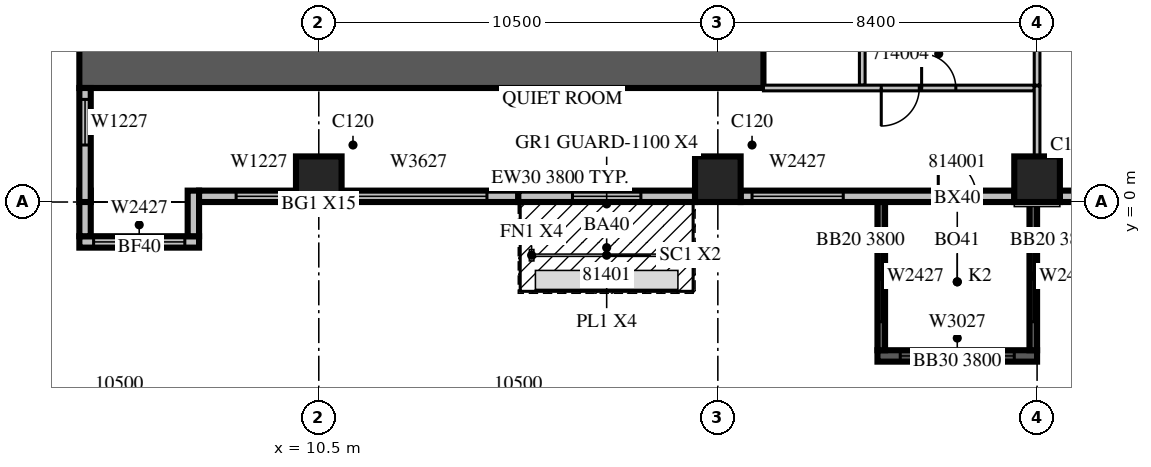
"""IFC4 building model, lengths in metres.
Left out: names, types, materials, properties, quantities, classifications, styles, units other than length and angle.
Written with IfcOpenShell. Run it as: python <this file> out.ifc"""

import sys

from ifc_helpers import new_model, si_unit, direction, frame, frame_2d, origin, origin_2d, place, context, subcontext, project, spatial, rectangle, extrude, source, transform, mapped, element, fill, save


model = new_model("IFC4")
c1 = context("Model", 3, precision=1e-05, world=origin(), true_north=direction((0.0, 1.0)))
c2 = subcontext(c1, "Body", "Model", "MODEL_VIEW")
j1 = project(units=[si_unit("LENGTHUNIT", "METRE"), si_unit("PLANEANGLEUNIT", "RADIAN")], contexts=[c1])
p1 = place(None, origin())
s1 = spatial("IfcSite", under=j1, at=p1, CompositionType="ELEMENT")
p2 = place(p1, origin())
s2 = spatial("IfcBuilding", under=s1, at=p2, CompositionType="ELEMENT")
p3 = place(p2, frame((0.0, 0.0, 69.9)))
s3 = spatial("IfcBuildingStorey", under=s2, at=p3, CompositionType="ELEMENT", Elevation=69.9)
m1 = source(origin(), c2, "Body", "SweptSolid", [
    extrude(rectangle(XDim=1.2, YDim=1.2, at=origin_2d()), origin(), (0.0, 0.0, 1.0), 4.2),
])
for number, where, z_axis, x_axis in (
    (1, (10.5, 0.6, 0.0), (0.0, 0.0, 1.0), (1.0, 0.0, 0.0)),
    (2, (21.0, 0.6, 0.0), (0.0, 0.0, 1.0), (1.0, 0.0, 0.0)),
    (3, (29.4, 0.6, 0.0), (0.0, 0.0, 1.0), (1.0, 0.0, 0.0)),
):
    element("IfcColumn", number, at=place(p3, frame(where, z_axis=z_axis, x_axis=x_axis)), inside=s3, PredefinedType="COLUMN", context=c2, shape_type="MappedRepresentation", body=[
        mapped(m1, transform((0.0, 0.0, 0.0), scale=1.0)),
    ])
m2 = source(origin(), c2, "Body", "SweptSolid", [
    extrude(rectangle(XDim=18.0, YDim=1.2, at=frame_2d((9.0, 0.0))), origin(), (0.0, 0.0, 1.0), 4.2),
])
p4 = place(p3, frame((4.2, 3.6, 0.0), z_axis=(0.0, 0.0, 1.0), x_axis=(1.0, 0.0, 0.0)))
e4 = element("IfcWall", 4, at=p4, inside=s3, PredefinedType="SHEAR", context=c2, shape_type="MappedRepresentation", body=[
    mapped(m2, transform((0.0, 0.0, 0.0), scale=1.0)),
])
m3 = source(origin(), c2, "Body", "SweptSolid", [
    extrude(rectangle(XDim=4.2, YDim=0.3, at=frame_2d((2.1, 0.0))), origin(), (0.0, 0.0, 1.0), 3.8),
])
p5 = place(p3, frame((25.2, -4.05, 0.0), z_axis=(0.0, 0.0, 1.0), x_axis=(1.0, 0.0, 0.0)))
e5 = element("IfcWall", 5, at=p5, inside=s3, PredefinedType="SOLIDWALL", context=c2, shape_type="MappedRepresentation", body=[
    mapped(m3, transform((0.0, 0.0, 0.0), scale=1.0)),
])
m4 = source(origin(), c2, "Body", "SweptSolid", [
    extrude(rectangle(XDim=3.0, YDim=2.7, at=frame_2d((1.5, 1.35))), frame((0.0, 0.16, 0.0), z_axis=(0.0, -1.0, 0.0), x_axis=(1.0, 0.0, 0.0)), (0.0, 0.0, 1.0), 0.32),
])
p6 = place(p5, frame((0.6, 0.0, 0.6)))
e6 = element("IfcOpeningElement", 6, at=p6, cuts=e5, PredefinedType="OPENING", context=c2, shape_type="MappedRepresentation", body=[
    mapped(m4, transform((0.0, 0.0, 0.0), scale=1.0)),
])
m5 = source(origin(), c2, "Body", "SweptSolid", [
    extrude(rectangle(XDim=3.9, YDim=0.2, at=frame_2d((1.95, 0.0))), origin(), (0.0, 0.0, 1.0), 3.8),
])
p7 = place(p3, frame((25.3, 0.0, 0.0), z_axis=(0.0, 0.0, 1.0), x_axis=(0.0, -1.0, 0.0)))
e7 = element("IfcWall", 7, at=p7, inside=s3, PredefinedType="SOLIDWALL", context=c2, shape_type="MappedRepresentation", body=[
    mapped(m5, transform((0.0, 0.0, 0.0), scale=1.0)),
])
m6 = source(origin(), c2, "Body", "SweptSolid", [
    extrude(rectangle(XDim=2.4, YDim=2.7, at=frame_2d((1.2, 1.35))), frame((0.0, 0.11, 0.0), z_axis=(0.0, -1.0, 0.0), x_axis=(1.0, 0.0, 0.0)), (0.0, 0.0, 1.0), 0.22),
])
p8 = place(p7, frame((0.75, 0.0, 0.6)))
e8 = element("IfcOpeningElement", 8, at=p8, cuts=e7, PredefinedType="OPENING", context=c2, shape_type="MappedRepresentation", body=[
    mapped(m6, transform((0.0, 0.0, 0.0), scale=1.0)),
])
p9 = place(p3, frame((29.3, 0.0, 0.0), z_axis=(0.0, 0.0, 1.0), x_axis=(0.0, -1.0, 0.0)))
e9 = element("IfcWall", 9, at=p9, inside=s3, PredefinedType="SOLIDWALL", context=c2, shape_type="MappedRepresentation", body=[
    mapped(m5, transform((0.0, 0.0, 0.0), scale=1.0)),
])
p10 = place(p9, frame((0.75, 0.0, 0.6)))
e10 = element("IfcOpeningElement", 10, at=p10, cuts=e9, PredefinedType="OPENING", context=c2, shape_type="MappedRepresentation", body=[
    mapped(m6, transform((0.0, 0.0, 0.0), scale=1.0)),
])
m7 = source(origin(), c2, "Body", "SweptSolid", [
    extrude(rectangle(XDim=3.15, YDim=0.3, at=frame_2d((1.575, 0.0))), origin(), (0.0, 0.0, 1.0), 3.8),
])
p11 = place(p3, frame((4.2, -1.05, 0.0), z_axis=(0.0, 0.0, 1.0), x_axis=(1.0, 0.0, 0.0)))
e11 = element("IfcWall", 11, at=p11, inside=s3, PredefinedType="STANDARD", context=c2, shape_type="MappedRepresentation", body=[
    mapped(m7, transform((0.0, 0.0, 0.0), scale=1.0)),
])
m8 = source(origin(), c2, "Body", "SweptSolid", [
    extrude(rectangle(XDim=2.4, YDim=2.7, at=frame_2d((1.2, 1.35))), frame((0.0, 0.16, 0.0), z_axis=(0.0, -1.0, 0.0), x_axis=(1.0, 0.0, 0.0)), (0.0, 0.0, 1.0), 0.32),
])
p12 = place(p11, frame((0.375, 0.0, 0.6)))
e12 = element("IfcOpeningElement", 12, at=p12, cuts=e11, PredefinedType="OPENING", context=c2, shape_type="MappedRepresentation", body=[
    mapped(m8, transform((0.0, 0.0, 0.0), scale=1.0)),
])
m9 = source(origin(), c2, "Body", "SweptSolid", [
    extrude(rectangle(XDim=1.2, YDim=0.3, at=frame_2d((0.6, 0.0))), origin(), (0.0, 0.0, 1.0), 3.8),
])
for number, where, z_axis, x_axis in (
    (13, (4.35, 0.3, 0.0), (0.0, 0.0, 1.0), (0.0, -1.0, 0.0)),
    (14, (7.2, 0.3, 0.0), (0.0, 0.0, 1.0), (0.0, -1.0, 0.0)),
):
    element("IfcWall", number, at=place(p3, frame(where, z_axis=z_axis, x_axis=x_axis)), inside=s3, PredefinedType="STANDARD", context=c2, shape_type="MappedRepresentation", body=[
        mapped(m9, transform((0.0, 0.0, 0.0), scale=1.0)),
    ])
m10 = source(origin(), c2, "Body", "SweptSolid", [
    extrude(rectangle(XDim=2.55, YDim=0.3, at=frame_2d((1.275, 0.0))), origin(), (0.0, 0.0, 1.0), 3.8),
])
p13 = place(p3, frame((7.35, 0.15, 0.0), z_axis=(0.0, 0.0, 1.0), x_axis=(1.0, 0.0, 0.0)))
e15 = element("IfcWall", 15, at=p13, inside=s3, PredefinedType="STANDARD", context=c2, shape_type="MappedRepresentation", body=[
    mapped(m10, transform((0.0, 0.0, 0.0), scale=1.0)),
])
m11 = source(origin(), c2, "Body", "SweptSolid", [
    extrude(rectangle(XDim=1.2, YDim=2.7, at=frame_2d((0.6, 1.35))), frame((0.0, 0.16, 0.0), z_axis=(0.0, -1.0, 0.0), x_axis=(1.0, 0.0, 0.0)), (0.0, 0.0, 1.0), 0.32),
])
p14 = place(p13, frame((0.975, 0.0, 0.6)))
e16 = element("IfcOpeningElement", 16, at=p14, cuts=e15, PredefinedType="OPENING", context=c2, shape_type="MappedRepresentation", body=[
    mapped(m11, transform((0.0, 0.0, 0.0), scale=1.0)),
])
m12 = source(origin(), c2, "Body", "SweptSolid", [
    extrude(rectangle(XDim=4.65, YDim=0.3, at=frame_2d((2.325, 0.0))), origin(), (0.0, 0.0, 1.0), 3.8),
])
p15 = place(p3, frame((11.1, 0.15, 0.0), z_axis=(0.0, 0.0, 1.0), x_axis=(1.0, 0.0, 0.0)))
e17 = element("IfcWall", 17, at=p15, inside=s3, PredefinedType="STANDARD", context=c2, shape_type="MappedRepresentation", body=[
    mapped(m12, transform((0.0, 0.0, 0.0), scale=1.0)),
])
m13 = source(origin(), c2, "Body", "SweptSolid", [
    extrude(rectangle(XDim=3.6, YDim=2.7, at=frame_2d((1.8, 1.35))), frame((0.0, 0.16, 0.0), z_axis=(0.0, -1.0, 0.0), x_axis=(1.0, 0.0, 0.0)), (0.0, 0.0, 1.0), 0.32),
])
p16 = place(p15, frame((0.225, 0.0, 0.6)))
e18 = element("IfcOpeningElement", 18, at=p16, cuts=e17, PredefinedType="OPENING", context=c2, shape_type="MappedRepresentation", body=[
    mapped(m13, transform((0.0, 0.0, 0.0), scale=1.0)),
])
p17 = place(p3, frame((15.75, 0.15, 0.0), z_axis=(0.0, 0.0, 1.0), x_axis=(1.0, 0.0, 0.0)))
e19 = element("IfcWall", 19, at=p17, inside=s3, PredefinedType="STANDARD", context=c2, shape_type="MappedRepresentation", body=[
    mapped(m12, transform((0.0, 0.0, 0.0), scale=1.0)),
])
m14 = source(origin(), c2, "Body", "SweptSolid", [
    extrude(rectangle(XDim=1.8, YDim=2.4, at=frame_2d((0.9, 1.2))), frame((0.0, 0.16, 0.0), z_axis=(0.0, -1.0, 0.0), x_axis=(1.0, 0.0, 0.0)), (0.0, 0.0, 1.0), 0.32),
])
p18 = place(p17, frame((1.425, 0.0, 0.0)))
e20 = element("IfcOpeningElement", 20, at=p18, cuts=e19, PredefinedType="OPENING", context=c2, shape_type="MappedRepresentation", body=[
    mapped(m14, transform((0.0, 0.0, 0.0), scale=1.0)),
])
m15 = source(origin(), c2, "Body", "SweptSolid", [
    extrude(rectangle(XDim=7.2, YDim=0.3, at=frame_2d((3.6, 0.0))), origin(), (0.0, 0.0, 1.0), 3.8),
])
p19 = place(p3, frame((21.6, 0.15, 0.0), z_axis=(0.0, 0.0, 1.0), x_axis=(1.0, 0.0, 0.0)))
e21 = element("IfcWall", 21, at=p19, inside=s3, PredefinedType="STANDARD", context=c2, shape_type="MappedRepresentation", body=[
    mapped(m15, transform((0.0, 0.0, 0.0), scale=1.0)),
])
p20 = place(p19, frame((0.3, 0.0, 0.6)))
e22 = element("IfcOpeningElement", 22, at=p20, cuts=e21, PredefinedType="OPENING", context=c2, shape_type="MappedRepresentation", body=[
    mapped(m8, transform((0.0, 0.0, 0.0), scale=1.0)),
])
m16 = source(origin(), c2, "Body", "SweptSolid", [
    extrude(rectangle(XDim=1.0, YDim=2.1, at=frame_2d((0.5, 1.05))), frame((0.0, 0.16, 0.0), z_axis=(0.0, -1.0, 0.0), x_axis=(1.0, 0.0, 0.0)), (0.0, 0.0, 1.0), 0.32),
])
p21 = place(p19, frame((5.2, 0.0, 0.0)))
e23 = element("IfcOpeningElement", 23, at=p21, cuts=e21, PredefinedType="OPENING", context=c2, shape_type="MappedRepresentation", body=[
    mapped(m16, transform((0.0, 0.0, 0.0), scale=1.0)),
])
p22 = place(p3, frame((30.0, 0.15, 0.0), z_axis=(0.0, 0.0, 1.0), x_axis=(1.0, 0.0, 0.0)))
e24 = element("IfcWall", 24, at=p22, inside=s3, PredefinedType="STANDARD", context=c2, shape_type="MappedRepresentation", body=[
    mapped(m15, transform((0.0, 0.0, 0.0), scale=1.0)),
])
m17 = source(origin(), c2, "Body", "SweptSolid", [
    extrude(rectangle(XDim=3.0, YDim=0.3, at=frame_2d((1.5, 0.0))), origin(), (0.0, 0.0, 1.0), 3.8),
])
p23 = place(p3, frame((4.35, 3.0, 0.0), z_axis=(0.0, 0.0, 1.0), x_axis=(0.0, -1.0, 0.0)))
e25 = element("IfcWall", 25, at=p23, inside=s3, PredefinedType="STANDARD", context=c2, shape_type="MappedRepresentation", body=[
    mapped(m17, transform((0.0, 0.0, 0.0), scale=1.0)),
])
p24 = place(p23, frame((0.3, 0.0, 0.6)))
e26 = element("IfcOpeningElement", 26, at=p24, cuts=e25, PredefinedType="OPENING", context=c2, shape_type="MappedRepresentation", body=[
    mapped(m11, transform((0.0, 0.0, 0.0), scale=1.0)),
])
m18 = source(origin(), c2, "Body", "SweptSolid", [
    extrude(rectangle(XDim=11.925, YDim=0.15, at=frame_2d((5.963, 0.0))), origin(), (0.0, 0.0, 1.0), 3.8),
])
p25 = place(p3, frame((24.8, 15.0, 0.0), z_axis=(0.0, 0.0, 1.0), x_axis=(0.0, -1.0, 0.0)))
e27 = element("IfcWall", 27, at=p25, inside=s3, PredefinedType="PARTITIONING", context=c2, shape_type="MappedRepresentation", body=[
    mapped(m18, transform((0.0, 0.0, 0.0), scale=1.0)),
])
m19 = source(origin(), c2, "Body", "SweptSolid", [
    extrude(rectangle(XDim=0.9, YDim=2.1, at=frame_2d((0.45, 1.05))), frame((0.0, 0.085, 0.0), z_axis=(0.0, -1.0, 0.0), x_axis=(1.0, 0.0, 0.0)), (0.0, 0.0, 1.0), 0.17),
])
p26 = place(p25, frame((7.162, 0.0, 0.0)))
e28 = element("IfcOpeningElement", 28, at=p26, cuts=e27, PredefinedType="OPENING", context=c2, shape_type="MappedRepresentation", body=[
    mapped(m19, transform((0.0, 0.0, 0.0), scale=1.0)),
])
p27 = place(p25, frame((0.325, 0.0, 0.0)))
e29 = element("IfcOpeningElement", 29, at=p27, cuts=e27, PredefinedType="OPENING", context=c2, shape_type="MappedRepresentation", body=[
    mapped(m19, transform((0.0, 0.0, 0.0), scale=1.0)),
])
m20 = source(origin(), c2, "Body", "SweptSolid", [
    extrude(rectangle(XDim=6.826, YDim=0.15, at=frame_2d((3.413, 0.0))), origin(), (0.0, 0.0, 1.0), 3.8),
])
p28 = place(p3, frame((29.4, 3.075, 0.0), z_axis=(0.0, 0.0, 1.0), x_axis=(0.0, 1.0, 0.0)))
e30 = element("IfcWall", 30, at=p28, inside=s3, PredefinedType="PARTITIONING", context=c2, shape_type="MappedRepresentation", body=[
    mapped(m20, transform((0.0, 0.0, 0.0), scale=1.0)),
])
m21 = source(origin(), c2, "Body", "SweptSolid", [
    extrude(rectangle(XDim=7.125, YDim=0.15, at=frame_2d((3.562, 0.0))), origin(), (0.0, 0.0, 1.0), 3.8),
])
p29 = place(p3, frame((22.2, 3.0, 0.0), z_axis=(0.0, 0.0, 1.0), x_axis=(1.0, 0.0, 0.0)))
e31 = element("IfcWall", 31, at=p29, inside=s3, PredefinedType="PARTITIONING", context=c2, shape_type="MappedRepresentation", body=[
    mapped(m21, transform((0.0, 0.0, 0.0), scale=1.0)),
])
m22 = source(origin(), c2, "Body", "SweptSolid", [
    extrude(rectangle(XDim=1.0, YDim=2.1, at=frame_2d((0.5, 1.05))), frame((0.0, 0.085, 0.0), z_axis=(0.0, -1.0, 0.0), x_axis=(1.0, 0.0, 0.0)), (0.0, 0.0, 1.0), 0.17),
])
p30 = place(p29, frame((3.1, 0.0, 0.0)))
e32 = element("IfcOpeningElement", 32, at=p30, cuts=e31, PredefinedType="OPENING", context=c2, shape_type="MappedRepresentation", body=[
    mapped(m22, transform((0.0, 0.0, 0.0), scale=1.0)),
])
p31 = place(p29, frame((4.162, 0.0, 0.0)))
e33 = element("IfcOpeningElement", 33, at=p31, cuts=e31, PredefinedType="OPENING", context=c2, shape_type="MappedRepresentation", body=[
    mapped(m19, transform((0.0, 0.0, 0.0), scale=1.0)),
])
m23 = source(origin(), c2, "Body", "SweptSolid", [
    extrude(rectangle(XDim=1.856, YDim=0.15, at=frame_2d((0.928, 0.0))), origin(), (0.0, 0.0, 1.0), 3.8),
])
p32 = place(p3, frame((29.4, 1.199, 0.0), z_axis=(0.0, 0.0, 1.0), x_axis=(0.0, 1.0, 0.0)))
e34 = element("IfcWall", 34, at=p32, inside=s3, PredefinedType="PARTITIONING", context=c2, shape_type="MappedRepresentation", body=[
    mapped(m23, transform((0.0, 0.0, 0.0), scale=1.0)),
])
m24 = source(origin(), c2, "Body", "SweptSolid", [
    extrude(rectangle(XDim=3.0, YDim=2.7, at=frame_2d((1.5, 1.35))), frame((0.0, 0.03, 0.0), z_axis=(0.0, -1.0, 0.0), x_axis=(1.0, 0.0, 0.0)), (0.0, 0.0, 1.0), 0.06),
])
p33 = place(p6, origin())
e35 = element("IfcWindow", 35, at=p33, inside=s3, PartitioningType="SINGLE_PANEL", PredefinedType="WINDOW", context=c2, shape_type="MappedRepresentation", body=[
    mapped(m24, transform((0.0, 0.0, 0.0), scale=1.0)),
])
fill(e6, e35)
m25 = source(origin(), c2, "Body", "SweptSolid", [
    extrude(rectangle(XDim=2.4, YDim=2.7, at=frame_2d((1.2, 1.35))), frame((0.0, 0.03, 0.0), z_axis=(0.0, -1.0, 0.0), x_axis=(1.0, 0.0, 0.0)), (0.0, 0.0, 1.0), 0.06),
])
p34 = place(p8, origin())
e36 = element("IfcWindow", 36, at=p34, inside=s3, PartitioningType="SINGLE_PANEL", PredefinedType="WINDOW", context=c2, shape_type="MappedRepresentation", body=[
    mapped(m25, transform((0.0, 0.0, 0.0), scale=1.0)),
])
fill(e8, e36)
p35 = place(p10, origin())
e37 = element("IfcWindow", 37, at=p35, inside=s3, PartitioningType="SINGLE_PANEL", PredefinedType="WINDOW", context=c2, shape_type="MappedRepresentation", body=[
    mapped(m25, transform((0.0, 0.0, 0.0), scale=1.0)),
])
fill(e10, e37)
p36 = place(p12, origin())
e38 = element("IfcWindow", 38, at=p36, inside=s3, PartitioningType="SINGLE_PANEL", PredefinedType="WINDOW", context=c2, shape_type="MappedRepresentation", body=[
    mapped(m25, transform((0.0, 0.0, 0.0), scale=1.0)),
])
fill(e12, e38)
m26 = source(origin(), c2, "Body", "SweptSolid", [
    extrude(rectangle(XDim=1.2, YDim=2.7, at=frame_2d((0.6, 1.35))), frame((0.0, 0.03, 0.0), z_axis=(0.0, -1.0, 0.0), x_axis=(1.0, 0.0, 0.0)), (0.0, 0.0, 1.0), 0.06),
])
p37 = place(p14, origin())
e39 = element("IfcWindow", 39, at=p37, inside=s3, PartitioningType="SINGLE_PANEL", PredefinedType="WINDOW", context=c2, shape_type="MappedRepresentation", body=[
    mapped(m26, transform((0.0, 0.0, 0.0), scale=1.0)),
])
fill(e16, e39)
m27 = source(origin(), c2, "Body", "SweptSolid", [
    extrude(rectangle(XDim=3.6, YDim=2.7, at=frame_2d((1.8, 1.35))), frame((0.0, 0.03, 0.0), z_axis=(0.0, -1.0, 0.0), x_axis=(1.0, 0.0, 0.0)), (0.0, 0.0, 1.0), 0.06),
])
p38 = place(p16, origin())
e40 = element("IfcWindow", 40, at=p38, inside=s3, PartitioningType="SINGLE_PANEL", PredefinedType="WINDOW", context=c2, shape_type="MappedRepresentation", body=[
    mapped(m27, transform((0.0, 0.0, 0.0), scale=1.0)),
])
fill(e18, e40)
m28 = source(origin(), c2, "Body", "SweptSolid", [
    extrude(rectangle(XDim=1.8, YDim=2.4, at=frame_2d((0.9, 1.2))), frame((0.0, 0.025, 0.0), z_axis=(0.0, -1.0, 0.0), x_axis=(1.0, 0.0, 0.0)), (0.0, 0.0, 1.0), 0.05),
])
p39 = place(p18, origin())
e41 = element("IfcDoor", 41, at=p39, inside=s3, OperationType="SLIDING_TO_LEFT", PredefinedType="DOOR", context=c2, shape_type="MappedRepresentation", body=[
    mapped(m28, transform((0.0, 0.0, 0.0), scale=1.0)),
])
fill(e20, e41)
p40 = place(p20, origin())
e42 = element("IfcWindow", 42, at=p40, inside=s3, PartitioningType="SINGLE_PANEL", PredefinedType="WINDOW", context=c2, shape_type="MappedRepresentation", body=[
    mapped(m25, transform((0.0, 0.0, 0.0), scale=1.0)),
])
fill(e22, e42)
p41 = place(p24, origin())
e43 = element("IfcWindow", 43, at=p41, inside=s3, PartitioningType="SINGLE_PANEL", PredefinedType="WINDOW", context=c2, shape_type="MappedRepresentation", body=[
    mapped(m26, transform((0.0, 0.0, 0.0), scale=1.0)),
])
fill(e26, e43)
m29 = source(origin(), c2, "Body", "SweptSolid", [
    extrude(rectangle(XDim=1.0, YDim=2.1, at=frame_2d((0.5, 1.05))), frame((0.0, 0.025, 0.0), z_axis=(0.0, -1.0, 0.0), x_axis=(1.0, 0.0, 0.0)), (0.0, 0.0, 1.0), 0.05),
])
p42 = place(p30, origin())
e44 = element("IfcDoor", 44, at=p42, inside=s3, OperationType="SINGLE_SWING_RIGHT", PredefinedType="DOOR", context=c2, shape_type="MappedRepresentation", body=[
    mapped(m29, transform((0.0, 0.0, 0.0), scale=1.0)),
])
fill(e32, e44)
m30 = source(origin(), c2, "Body", "SweptSolid", [
    extrude(rectangle(XDim=0.9, YDim=2.1, at=frame_2d((0.45, 1.05))), frame((0.0, 0.025, 0.0), z_axis=(0.0, -1.0, 0.0), x_axis=(1.0, 0.0, 0.0)), (0.0, 0.0, 1.0), 0.05),
])
p43 = place(p31, origin())
e45 = element("IfcDoor", 45, at=p43, inside=s3, OperationType="SINGLE_SWING_LEFT", PredefinedType="DOOR", context=c2, shape_type="MappedRepresentation", body=[
    mapped(m30, transform((0.0, 0.0, 0.0), scale=1.0)),
])
fill(e33, e45)
p44 = place(p21, origin())
e46 = element("IfcDoor", 46, at=p44, inside=s3, OperationType="SINGLE_SWING_LEFT", PredefinedType="DOOR", context=c2, shape_type="MappedRepresentation", body=[
    mapped(m29, transform((0.0, 0.0, 0.0), scale=1.0)),
])
fill(e23, e46)
save(model, sys.argv[1])
